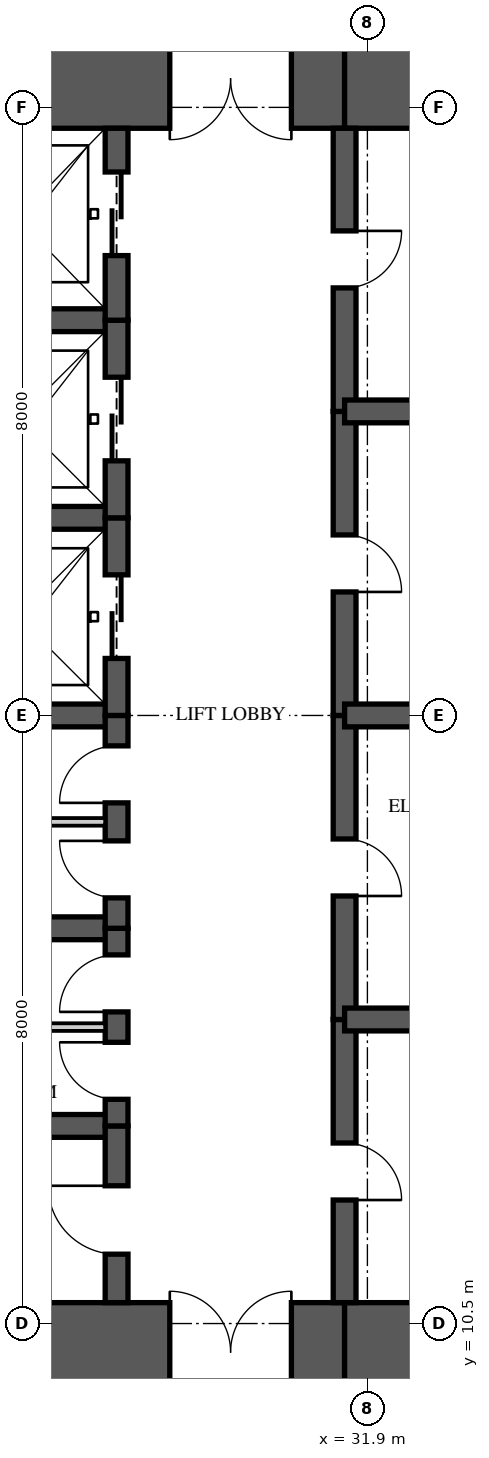
"""IFC4 building model, lengths in metres.
Left out: names, types, materials, properties, quantities, classifications, styles, units other than length and angle.
Written with IfcOpenShell. Run it as: python <this file> out.ifc"""

import sys

from ifc_helpers import new_model, si_unit, direction, frame, frame_2d, origin, place, context, subcontext, project, spatial, rectangle, extrude, element, fill, save


model = new_model("IFC4")
c1 = context("Model", 3, precision=1e-05, world=origin(), true_north=direction((0.0, 1.0)))
c2 = subcontext(c1, "Body", "Model", "MODEL_VIEW")
j1 = project(units=[si_unit("LENGTHUNIT", "METRE"), si_unit("PLANEANGLEUNIT", "RADIAN")], contexts=[c1])
p1 = place(None, origin())
s1 = spatial("IfcSite", under=j1, at=p1, CompositionType="ELEMENT")
p2 = place(p1, origin())
s2 = spatial("IfcBuilding", under=s1, at=p2, CompositionType="ELEMENT")
p3 = place(p2, frame((0.0, 0.0, 154.35)))
s3 = spatial("IfcBuildingStorey", under=s2, at=p3, CompositionType="ELEMENT", Elevation=154.35)
p4 = place(p3, frame((26.0, 10.125, 0.0), z_axis=(0.0, 0.0, 1.0), x_axis=(1.0, 0.0, 0.0)))
e1 = element("IfcWall", 1, at=p4, inside=s3, PredefinedType="SHEAR", context=c2, shape_type="SweptSolid", body=[
    extrude(rectangle(XDim=5.6, YDim=1.3, at=frame_2d((2.8, 0.0))), origin(), (0.0, 0.0, 1.0), 3.35),
])
p5 = place(p4, frame((3.3, 0.0, 0.0)))
e2 = element("IfcOpeningElement", 2, at=p5, cuts=e1, PredefinedType="OPENING", context=c2, shape_type="SweptSolid", body=[
    extrude(rectangle(XDim=1.6, YDim=2.1, at=frame_2d((0.8, 1.05))), frame((0.0, 0.66, 0.0), z_axis=(0.0, -1.0, 0.0), x_axis=(1.0, 0.0, 0.0)), (0.0, 0.0, 1.0), 1.32),
])
for number, where, z_axis, x_axis in (
    (3, (31.6, 10.125, 0.0), (0.0, 0.0, 1.0), (1.0, 0.0, 0.0)),
    (4, (35.9, 26.875, 0.0), (0.0, 0.0, 1.0), (-1.0, 0.0, 0.0)),
):
    element("IfcWall", number, at=place(p3, frame(where, z_axis=z_axis, x_axis=x_axis)), inside=s3, PredefinedType="SHEAR", context=c2, shape_type="SweptSolid", body=[
        extrude(rectangle(XDim=4.3, YDim=1.3, at=frame_2d((2.15, 0.0))), origin(), (0.0, 0.0, 1.0), 3.35),
    ])
p6 = place(p3, frame((31.6, 26.875, 0.0), z_axis=(0.0, 0.0, 1.0), x_axis=(-1.0, 0.0, 0.0)))
e5 = element("IfcWall", 5, at=p6, inside=s3, PredefinedType="SHEAR", context=c2, shape_type="SweptSolid", body=[
    extrude(rectangle(XDim=5.6, YDim=1.3, at=frame_2d((2.8, 0.0))), origin(), (0.0, 0.0, 1.0), 3.35),
])
p7 = place(p6, frame((0.7, 0.0, 0.0)))
e6 = element("IfcOpeningElement", 6, at=p7, cuts=e5, PredefinedType="OPENING", context=c2, shape_type="SweptSolid", body=[
    extrude(rectangle(XDim=1.6, YDim=2.1, at=frame_2d((0.8, 1.05))), frame((0.0, 0.66, 0.0), z_axis=(0.0, -1.0, 0.0), x_axis=(1.0, 0.0, 0.0)), (0.0, 0.0, 1.0), 1.32),
])
p8 = place(p3, frame((28.6, 10.775, 0.0), z_axis=(0.0, 0.0, 1.0), x_axis=(0.0, 1.0, 0.0)))
e7 = element("IfcWall", 7, at=p8, inside=s3, PredefinedType="SHEAR", context=c2, shape_type="SweptSolid", body=[
    extrude(rectangle(XDim=2.325, YDim=0.3, at=frame_2d((1.163, 0.0))), origin(), (0.0, 0.0, 1.0), 3.35),
])
p9 = place(p8, frame((0.637, 0.0, 0.0)))
e8 = element("IfcOpeningElement", 8, at=p9, cuts=e7, PredefinedType="OPENING", context=c2, shape_type="SweptSolid", body=[
    extrude(rectangle(XDim=0.9, YDim=2.1, at=frame_2d((0.45, 1.05))), frame((0.0, 0.16, 0.0), z_axis=(0.0, -1.0, 0.0), x_axis=(1.0, 0.0, 0.0)), (0.0, 0.0, 1.0), 0.32),
])
p10 = place(p3, frame((28.6, 13.1, 0.0), z_axis=(0.0, 0.0, 1.0), x_axis=(0.0, 1.0, 0.0)))
e9 = element("IfcWall", 9, at=p10, inside=s3, PredefinedType="SHEAR", context=c2, shape_type="SweptSolid", body=[
    extrude(rectangle(XDim=2.6, YDim=0.3, at=frame_2d((1.3, 0.0))), origin(), (0.0, 0.0, 1.0), 3.35),
])
p11 = place(p10, frame((0.35, 0.0, 0.0)))
e10 = element("IfcOpeningElement", 10, at=p11, cuts=e9, PredefinedType="OPENING", context=c2, shape_type="SweptSolid", body=[
    extrude(rectangle(XDim=0.75, YDim=2.1, at=frame_2d((0.375, 1.05))), frame((0.0, 0.16, 0.0), z_axis=(0.0, -1.0, 0.0), x_axis=(1.0, 0.0, 0.0)), (0.0, 0.0, 1.0), 0.32),
])
p12 = place(p10, frame((1.5, 0.0, 0.0)))
e11 = element("IfcOpeningElement", 11, at=p12, cuts=e9, PredefinedType="OPENING", context=c2, shape_type="SweptSolid", body=[
    extrude(rectangle(XDim=0.75, YDim=2.1, at=frame_2d((0.375, 1.05))), frame((0.0, 0.16, 0.0), z_axis=(0.0, -1.0, 0.0), x_axis=(1.0, 0.0, 0.0)), (0.0, 0.0, 1.0), 0.32),
])
p13 = place(p3, frame((28.6, 15.7, 0.0), z_axis=(0.0, 0.0, 1.0), x_axis=(0.0, 1.0, 0.0)))
e12 = element("IfcWall", 12, at=p13, inside=s3, PredefinedType="SHEAR", context=c2, shape_type="SweptSolid", body=[
    extrude(rectangle(XDim=2.8, YDim=0.3, at=frame_2d((1.4, 0.0))), origin(), (0.0, 0.0, 1.0), 3.35),
])
p14 = place(p13, frame((0.4, 0.0, 0.0)))
e13 = element("IfcOpeningElement", 13, at=p14, cuts=e12, PredefinedType="OPENING", context=c2, shape_type="SweptSolid", body=[
    extrude(rectangle(XDim=0.75, YDim=2.1, at=frame_2d((0.375, 1.05))), frame((0.0, 0.16, 0.0), z_axis=(0.0, -1.0, 0.0), x_axis=(1.0, 0.0, 0.0)), (0.0, 0.0, 1.0), 0.32),
])
p15 = place(p13, frame((1.65, 0.0, 0.0)))
e14 = element("IfcOpeningElement", 14, at=p15, cuts=e12, PredefinedType="OPENING", context=c2, shape_type="SweptSolid", body=[
    extrude(rectangle(XDim=0.75, YDim=2.1, at=frame_2d((0.375, 1.05))), frame((0.0, 0.16, 0.0), z_axis=(0.0, -1.0, 0.0), x_axis=(1.0, 0.0, 0.0)), (0.0, 0.0, 1.0), 0.32),
])
p16 = place(p3, frame((28.6, 18.5, 0.0), z_axis=(0.0, 0.0, 1.0), x_axis=(0.0, 1.0, 0.0)))
e15 = element("IfcWall", 15, at=p16, inside=s3, PredefinedType="SHEAR", context=c2, shape_type="SweptSolid", body=[
    extrude(rectangle(XDim=2.6, YDim=0.3, at=frame_2d((1.3, 0.0))), origin(), (0.0, 0.0, 1.0), 3.35),
])
p17 = place(p16, frame((0.75, 0.0, 0.0)))
e16 = element("IfcOpeningElement", 16, at=p17, cuts=e15, PredefinedType="OPENING", context=c2, shape_type="SweptSolid", body=[
    extrude(rectangle(XDim=1.1, YDim=2.1, at=frame_2d((0.55, 1.05))), frame((0.0, 0.16, 0.0), z_axis=(0.0, -1.0, 0.0), x_axis=(1.0, 0.0, 0.0)), (0.0, 0.0, 1.0), 0.32),
])
p18 = place(p3, frame((28.6, 21.1, 0.0), z_axis=(0.0, 0.0, 1.0), x_axis=(0.0, 1.0, 0.0)))
e17 = element("IfcWall", 17, at=p18, inside=s3, PredefinedType="SHEAR", context=c2, shape_type="SweptSolid", body=[
    extrude(rectangle(XDim=2.6, YDim=0.3, at=frame_2d((1.3, 0.0))), origin(), (0.0, 0.0, 1.0), 3.35),
])
p19 = place(p18, frame((0.75, 0.0, 0.0)))
e18 = element("IfcOpeningElement", 18, at=p19, cuts=e17, PredefinedType="OPENING", context=c2, shape_type="SweptSolid", body=[
    extrude(rectangle(XDim=1.1, YDim=2.1, at=frame_2d((0.55, 1.05))), frame((0.0, 0.16, 0.0), z_axis=(0.0, -1.0, 0.0), x_axis=(1.0, 0.0, 0.0)), (0.0, 0.0, 1.0), 0.32),
])
p20 = place(p3, frame((28.6, 23.7, 0.0), z_axis=(0.0, 0.0, 1.0), x_axis=(0.0, 1.0, 0.0)))
e19 = element("IfcWall", 19, at=p20, inside=s3, PredefinedType="SHEAR", context=c2, shape_type="SweptSolid", body=[
    extrude(rectangle(XDim=2.525, YDim=0.3, at=frame_2d((1.263, 0.0))), origin(), (0.0, 0.0, 1.0), 3.35),
])
p21 = place(p20, frame((0.85, 0.0, 0.0)))
e20 = element("IfcOpeningElement", 20, at=p21, cuts=e19, PredefinedType="OPENING", context=c2, shape_type="SweptSolid", body=[
    extrude(rectangle(XDim=1.1, YDim=2.1, at=frame_2d((0.55, 1.05))), frame((0.0, 0.16, 0.0), z_axis=(0.0, -1.0, 0.0), x_axis=(1.0, 0.0, 0.0)), (0.0, 0.0, 1.0), 0.32),
])
p22 = place(p3, frame((31.6, 10.775, 0.0), z_axis=(0.0, 0.0, 1.0), x_axis=(0.0, 1.0, 0.0)))
e21 = element("IfcWall", 21, at=p22, inside=s3, PredefinedType="SHEAR", context=c2, shape_type="SweptSolid", body=[
    extrude(rectangle(XDim=3.725, YDim=0.3, at=frame_2d((1.863, 0.0))), origin(), (0.0, 0.0, 1.0), 3.35),
])
p23 = place(p22, frame((1.35, 0.0, 0.0)))
e22 = element("IfcOpeningElement", 22, at=p23, cuts=e21, PredefinedType="OPENING", context=c2, shape_type="SweptSolid", body=[
    extrude(rectangle(XDim=0.75, YDim=2.1, at=frame_2d((0.375, 1.05))), frame((0.0, 0.16, 0.0), z_axis=(0.0, -1.0, 0.0), x_axis=(1.0, 0.0, 0.0)), (0.0, 0.0, 1.0), 0.32),
])
p24 = place(p3, frame((31.6, 14.5, 0.0), z_axis=(0.0, 0.0, 1.0), x_axis=(0.0, 1.0, 0.0)))
e23 = element("IfcWall", 23, at=p24, inside=s3, PredefinedType="SHEAR", context=c2, shape_type="SweptSolid", body=[
    extrude(rectangle(XDim=4.0, YDim=0.3, at=frame_2d((2.0, 0.0))), origin(), (0.0, 0.0, 1.0), 3.35),
])
p25 = place(p24, frame((1.625, 0.0, 0.0)))
e24 = element("IfcOpeningElement", 24, at=p25, cuts=e23, PredefinedType="OPENING", context=c2, shape_type="SweptSolid", body=[
    extrude(rectangle(XDim=0.75, YDim=2.1, at=frame_2d((0.375, 1.05))), frame((0.0, 0.16, 0.0), z_axis=(0.0, -1.0, 0.0), x_axis=(1.0, 0.0, 0.0)), (0.0, 0.0, 1.0), 0.32),
])
p26 = place(p3, frame((31.6, 18.5, 0.0), z_axis=(0.0, 0.0, 1.0), x_axis=(0.0, 1.0, 0.0)))
e25 = element("IfcWall", 25, at=p26, inside=s3, PredefinedType="SHEAR", context=c2, shape_type="SweptSolid", body=[
    extrude(rectangle(XDim=4.0, YDim=0.3, at=frame_2d((2.0, 0.0))), origin(), (0.0, 0.0, 1.0), 3.35),
])
p27 = place(p26, frame((1.625, 0.0, 0.0)))
e26 = element("IfcOpeningElement", 26, at=p27, cuts=e25, PredefinedType="OPENING", context=c2, shape_type="SweptSolid", body=[
    extrude(rectangle(XDim=0.75, YDim=2.1, at=frame_2d((0.375, 1.05))), frame((0.0, 0.16, 0.0), z_axis=(0.0, -1.0, 0.0), x_axis=(1.0, 0.0, 0.0)), (0.0, 0.0, 1.0), 0.32),
])
p28 = place(p3, frame((31.6, 22.5, 0.0), z_axis=(0.0, 0.0, 1.0), x_axis=(0.0, 1.0, 0.0)))
e27 = element("IfcWall", 27, at=p28, inside=s3, PredefinedType="SHEAR", context=c2, shape_type="SweptSolid", body=[
    extrude(rectangle(XDim=3.725, YDim=0.3, at=frame_2d((1.863, 0.0))), origin(), (0.0, 0.0, 1.0), 3.35),
])
p29 = place(p28, frame((1.625, 0.0, 0.0)))
e28 = element("IfcOpeningElement", 28, at=p29, cuts=e27, PredefinedType="OPENING", context=c2, shape_type="SweptSolid", body=[
    extrude(rectangle(XDim=0.75, YDim=2.1, at=frame_2d((0.375, 1.05))), frame((0.0, 0.16, 0.0), z_axis=(0.0, -1.0, 0.0), x_axis=(1.0, 0.0, 0.0)), (0.0, 0.0, 1.0), 0.32),
])
for number, where, z_axis, x_axis in (
    (29, (26.0, 13.1, 0.0), (0.0, 0.0, 1.0), (1.0, 0.0, 0.0)),
    (30, (26.0, 15.7, 0.0), (0.0, 0.0, 1.0), (1.0, 0.0, 0.0)),
    (31, (26.0, 18.5, 0.0), (0.0, 0.0, 1.0), (1.0, 0.0, 0.0)),
    (32, (26.0, 21.1, 0.0), (0.0, 0.0, 1.0), (1.0, 0.0, 0.0)),
    (33, (26.0, 23.7, 0.0), (0.0, 0.0, 1.0), (1.0, 0.0, 0.0)),
):
    element("IfcWall", number, at=place(p3, frame(where, z_axis=z_axis, x_axis=x_axis)), inside=s3, PredefinedType="SHEAR", context=c2, shape_type="SweptSolid", body=[
        extrude(rectangle(XDim=2.6, YDim=0.3, at=frame_2d((1.3, 0.0))), origin(), (0.0, 0.0, 1.0), 3.35),
    ])
for number, where, z_axis, x_axis in (
    (34, (31.6, 14.5, 0.0), (0.0, 0.0, 1.0), (1.0, 0.0, 0.0)),
    (35, (31.6, 18.5, 0.0), (0.0, 0.0, 1.0), (1.0, 0.0, 0.0)),
    (36, (31.6, 22.5, 0.0), (0.0, 0.0, 1.0), (1.0, 0.0, 0.0)),
):
    element("IfcWall", number, at=place(p3, frame(where, z_axis=z_axis, x_axis=x_axis)), inside=s3, PredefinedType="SHEAR", context=c2, shape_type="SweptSolid", body=[
        extrude(rectangle(XDim=4.3, YDim=0.3, at=frame_2d((2.15, 0.0))), origin(), (0.0, 0.0, 1.0), 3.35),
    ])
for number, where, z_axis, x_axis in (
    (37, (26.15, 14.4, 0.0), (0.0, 0.0, 1.0), (1.0, 0.0, 0.0)),
    (38, (26.15, 17.1, 0.0), (0.0, 0.0, 1.0), (1.0, 0.0, 0.0)),
):
    element("IfcWall", number, at=place(p3, frame(where, z_axis=z_axis, x_axis=x_axis)), inside=s3, PredefinedType="PARTITIONING", context=c2, shape_type="SweptSolid", body=[
        extrude(rectangle(XDim=2.3, YDim=0.1, at=frame_2d((1.15, 0.0))), origin(), (0.0, 0.0, 1.0), 3.11),
    ])
p30 = place(p17, origin())
e39 = element("IfcDoor", 39, at=p30, inside=s3, OperationType="SLIDING_TO_LEFT", PredefinedType="DOOR", context=c2, shape_type="SweptSolid", body=[
    extrude(rectangle(XDim=1.1, YDim=2.1, at=frame_2d((0.55, 1.05))), frame((0.0, 0.025, 0.0), z_axis=(0.0, -1.0, 0.0), x_axis=(1.0, 0.0, 0.0)), (0.0, 0.0, 1.0), 0.05),
])
fill(e16, e39)
p31 = place(p19, origin())
e40 = element("IfcDoor", 40, at=p31, inside=s3, OperationType="SLIDING_TO_LEFT", PredefinedType="DOOR", context=c2, shape_type="SweptSolid", body=[
    extrude(rectangle(XDim=1.1, YDim=2.1, at=frame_2d((0.55, 1.05))), frame((0.0, 0.025, 0.0), z_axis=(0.0, -1.0, 0.0), x_axis=(1.0, 0.0, 0.0)), (0.0, 0.0, 1.0), 0.05),
])
fill(e18, e40)
p32 = place(p21, origin())
e41 = element("IfcDoor", 41, at=p32, inside=s3, OperationType="SLIDING_TO_LEFT", PredefinedType="DOOR", context=c2, shape_type="SweptSolid", body=[
    extrude(rectangle(XDim=1.1, YDim=2.1, at=frame_2d((0.55, 1.05))), frame((0.0, 0.025, 0.0), z_axis=(0.0, -1.0, 0.0), x_axis=(1.0, 0.0, 0.0)), (0.0, 0.0, 1.0), 0.05),
])
fill(e20, e41)
p33 = place(p9, origin())
e42 = element("IfcDoor", 42, at=p33, inside=s3, OperationType="SINGLE_SWING_RIGHT", PredefinedType="DOOR", context=c2, shape_type="SweptSolid", body=[
    extrude(rectangle(XDim=0.9, YDim=2.1, at=frame_2d((0.45, 1.05))), frame((0.0, 0.025, 0.0), z_axis=(0.0, -1.0, 0.0), x_axis=(1.0, 0.0, 0.0)), (0.0, 0.0, 1.0), 0.05),
])
fill(e8, e42)
p34 = place(p11, origin())
e43 = element("IfcDoor", 43, at=p34, inside=s3, OperationType="SINGLE_SWING_RIGHT", PredefinedType="DOOR", context=c2, shape_type="SweptSolid", body=[
    extrude(rectangle(XDim=0.75, YDim=2.1, at=frame_2d((0.375, 1.05))), frame((0.0, 0.025, 0.0), z_axis=(0.0, -1.0, 0.0), x_axis=(1.0, 0.0, 0.0)), (0.0, 0.0, 1.0), 0.05),
])
fill(e10, e43)
p35 = place(p12, origin())
e44 = element("IfcDoor", 44, at=p35, inside=s3, OperationType="SINGLE_SWING_LEFT", PredefinedType="DOOR", context=c2, shape_type="SweptSolid", body=[
    extrude(rectangle(XDim=0.75, YDim=2.1, at=frame_2d((0.375, 1.05))), frame((0.0, 0.025, 0.0), z_axis=(0.0, -1.0, 0.0), x_axis=(1.0, 0.0, 0.0)), (0.0, 0.0, 1.0), 0.05),
])
fill(e11, e44)
p36 = place(p14, origin())
e45 = element("IfcDoor", 45, at=p36, inside=s3, OperationType="SINGLE_SWING_RIGHT", PredefinedType="DOOR", context=c2, shape_type="SweptSolid", body=[
    extrude(rectangle(XDim=0.75, YDim=2.1, at=frame_2d((0.375, 1.05))), frame((0.0, 0.025, 0.0), z_axis=(0.0, -1.0, 0.0), x_axis=(1.0, 0.0, 0.0)), (0.0, 0.0, 1.0), 0.05),
])
fill(e13, e45)
p37 = place(p15, origin())
e46 = element("IfcDoor", 46, at=p37, inside=s3, OperationType="SINGLE_SWING_LEFT", PredefinedType="DOOR", context=c2, shape_type="SweptSolid", body=[
    extrude(rectangle(XDim=0.75, YDim=2.1, at=frame_2d((0.375, 1.05))), frame((0.0, 0.025, 0.0), z_axis=(0.0, -1.0, 0.0), x_axis=(1.0, 0.0, 0.0)), (0.0, 0.0, 1.0), 0.05),
])
fill(e14, e46)
p38 = place(p5, origin())
e47 = element("IfcDoor", 47, at=p38, inside=s3, OperationType="DOUBLE_DOOR_SINGLE_SWING", PredefinedType="DOOR", context=c2, shape_type="SweptSolid", body=[
    extrude(rectangle(XDim=1.6, YDim=2.1, at=frame_2d((0.8, 1.05))), frame((0.0, 0.025, 0.0), z_axis=(0.0, -1.0, 0.0), x_axis=(1.0, 0.0, 0.0)), (0.0, 0.0, 1.0), 0.05),
])
fill(e2, e47)
p39 = place(p7, origin())
e48 = element("IfcDoor", 48, at=p39, inside=s3, OperationType="DOUBLE_DOOR_SINGLE_SWING", PredefinedType="DOOR", context=c2, shape_type="SweptSolid", body=[
    extrude(rectangle(XDim=1.6, YDim=2.1, at=frame_2d((0.8, 1.05))), frame((0.0, 0.025, 0.0), z_axis=(0.0, -1.0, 0.0), x_axis=(1.0, 0.0, 0.0)), (0.0, 0.0, 1.0), 0.05),
])
fill(e6, e48)
p40 = place(p23, frame((0.75, 0.0, 0.0), z_axis=(0.0, 0.0, 1.0), x_axis=(-1.0, 0.0, 0.0)))
e49 = element("IfcDoor", 49, at=p40, inside=s3, OperationType="SINGLE_SWING_RIGHT", PredefinedType="DOOR", context=c2, shape_type="SweptSolid", body=[
    extrude(rectangle(XDim=0.75, YDim=2.1, at=frame_2d((0.375, 1.05))), frame((0.0, 0.025, 0.0), z_axis=(0.0, -1.0, 0.0), x_axis=(1.0, 0.0, 0.0)), (0.0, 0.0, 1.0), 0.05),
])
fill(e22, e49)
p41 = place(p25, frame((0.75, 0.0, 0.0), z_axis=(0.0, 0.0, 1.0), x_axis=(-1.0, 0.0, 0.0)))
e50 = element("IfcDoor", 50, at=p41, inside=s3, OperationType="SINGLE_SWING_RIGHT", PredefinedType="DOOR", context=c2, shape_type="SweptSolid", body=[
    extrude(rectangle(XDim=0.75, YDim=2.1, at=frame_2d((0.375, 1.05))), frame((0.0, 0.025, 0.0), z_axis=(0.0, -1.0, 0.0), x_axis=(1.0, 0.0, 0.0)), (0.0, 0.0, 1.0), 0.05),
])
fill(e24, e50)
p42 = place(p27, frame((0.75, 0.0, 0.0), z_axis=(0.0, 0.0, 1.0), x_axis=(-1.0, 0.0, 0.0)))
e51 = element("IfcDoor", 51, at=p42, inside=s3, OperationType="SINGLE_SWING_RIGHT", PredefinedType="DOOR", context=c2, shape_type="SweptSolid", body=[
    extrude(rectangle(XDim=0.75, YDim=2.1, at=frame_2d((0.375, 1.05))), frame((0.0, 0.025, 0.0), z_axis=(0.0, -1.0, 0.0), x_axis=(1.0, 0.0, 0.0)), (0.0, 0.0, 1.0), 0.05),
])
fill(e26, e51)
p43 = place(p29, frame((0.75, 0.0, 0.0), z_axis=(0.0, 0.0, 1.0), x_axis=(-1.0, 0.0, 0.0)))
e52 = element("IfcDoor", 52, at=p43, inside=s3, OperationType="SINGLE_SWING_LEFT", PredefinedType="DOOR", context=c2, shape_type="SweptSolid", body=[
    extrude(rectangle(XDim=0.75, YDim=2.1, at=frame_2d((0.375, 1.05))), frame((0.0, 0.025, 0.0), z_axis=(0.0, -1.0, 0.0), x_axis=(1.0, 0.0, 0.0)), (0.0, 0.0, 1.0), 0.05),
])
fill(e28, e52)
save(model, sys.argv[1])
